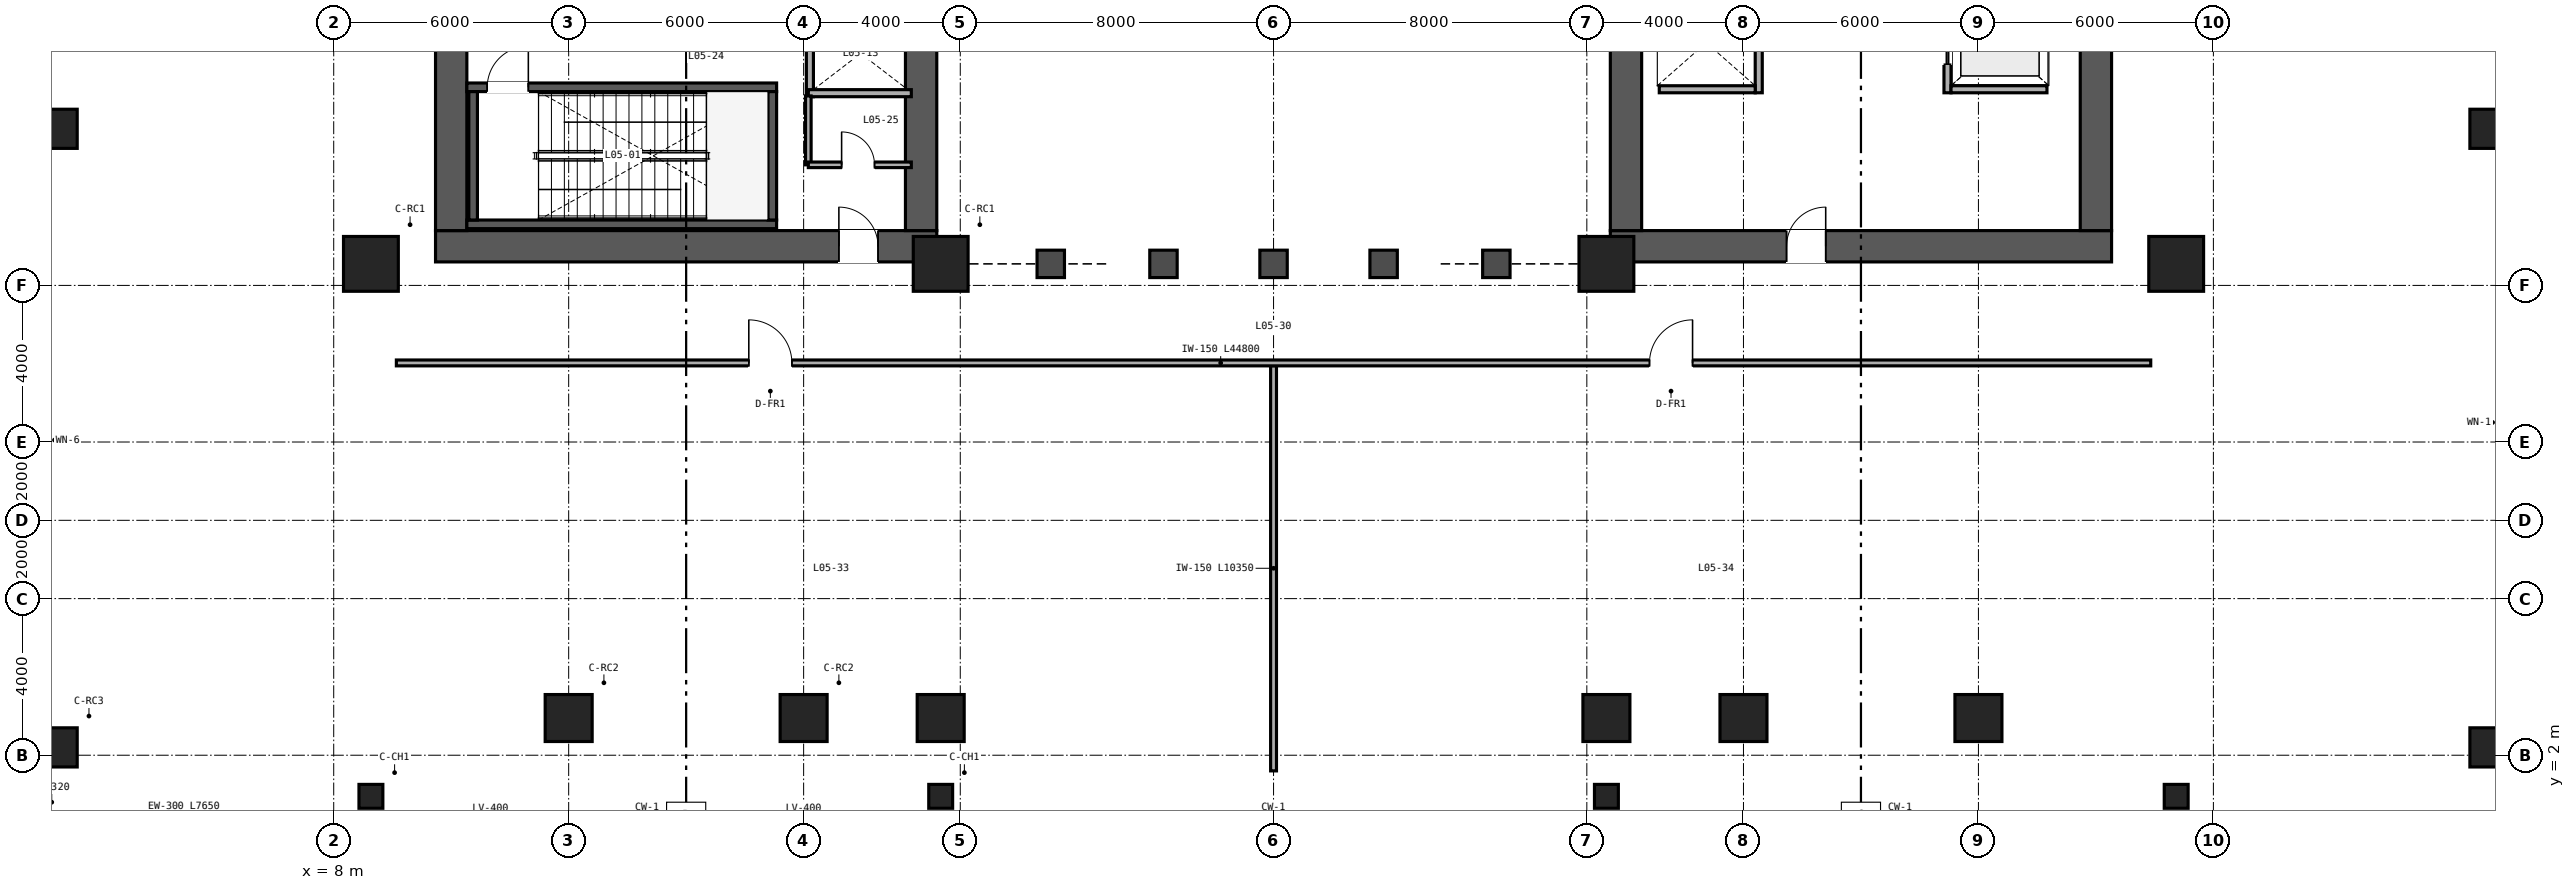
"""IFC4 building model, lengths in metres.
Left out: names, types, materials, properties, quantities, classifications, styles, units other than length and angle.
Written with IfcOpenShell. Run it as: python <this file> out.ifc"""

import sys

from ifc_helpers import new_model, si_unit, direction, frame, frame_2d, origin, origin_2d, place, context, subcontext, project, spatial, rectangle, hollow_circle, extrude, source, transform, mapped, element, fill, save


model = new_model("IFC4")
c1 = context("Model", 3, precision=1e-05, world=origin(), true_north=direction((0.0, 1.0)))
c2 = subcontext(c1, "Body", "Model", "MODEL_VIEW")
j1 = project(units=[si_unit("LENGTHUNIT", "METRE"), si_unit("PLANEANGLEUNIT", "RADIAN")], contexts=[c1])
p1 = place(None, origin())
s1 = spatial("IfcSite", under=j1, at=p1, CompositionType="ELEMENT")
p2 = place(p1, origin())
s2 = spatial("IfcBuilding", under=s1, at=p2, CompositionType="ELEMENT")
p3 = place(p2, frame((0.0, 0.0, 24.0)))
s3 = spatial("IfcBuildingStorey", under=s2, at=p3, CompositionType="ELEMENT", Elevation=24.0)
p4 = place(p3, frame((10.6, 15.0, 0.0), z_axis=(0.0, 0.0, 1.0), x_axis=(1.0, 0.0, 0.0)))
e1 = element("IfcWall", 1, at=p4, inside=s3, PredefinedType="SHEAR", context=c2, shape_type="SweptSolid", body=[
    extrude(rectangle(XDim=12.8, YDim=0.8, at=frame_2d((6.4, 0.0))), origin(), (0.0, 0.0, 1.0), 4.48),
])
p5 = place(p4, frame((10.3, 0.0, 0.0)))
e2 = element("IfcOpeningElement", 2, at=p5, cuts=e1, PredefinedType="OPENING", context=c2, shape_type="SweptSolid", body=[
    extrude(rectangle(XDim=1.0, YDim=2.15, at=frame_2d((0.5, 1.075))), frame((0.0, 0.41, 0.0), z_axis=(0.0, -1.0, 0.0), x_axis=(1.0, 0.0, 0.0)), (0.0, 0.0, 1.0), 0.82),
])
for number, where, z_axis, x_axis in (
    (3, (11.0, 15.4, 0.0), (0.0, 0.0, 1.0), (0.0, 1.0, 0.0)),
    (4, (23.0, 15.4, 0.0), (0.0, 0.0, 1.0), (0.0, 1.0, 0.0)),
):
    element("IfcWall", number, at=place(p3, frame(where, z_axis=z_axis, x_axis=x_axis)), inside=s3, PredefinedType="SHEAR", context=c2, shape_type="SweptSolid", body=[
        extrude(rectangle(XDim=21.2, YDim=0.8, at=frame_2d((10.6, 0.0))), origin(), (0.0, 0.0, 1.0), 4.48),
    ])
p6 = place(p3, frame((40.6, 15.0, 0.0), z_axis=(0.0, 0.0, 1.0), x_axis=(1.0, 0.0, 0.0)))
e5 = element("IfcWall", 5, at=p6, inside=s3, PredefinedType="SHEAR", context=c2, shape_type="SweptSolid", body=[
    extrude(rectangle(XDim=12.8, YDim=0.8, at=frame_2d((6.4, 0.0))), origin(), (0.0, 0.0, 1.0), 4.48),
])
p7 = place(p6, frame((4.5, 0.0, 0.0)))
e6 = element("IfcOpeningElement", 6, at=p7, cuts=e5, PredefinedType="OPENING", context=c2, shape_type="SweptSolid", body=[
    extrude(rectangle(XDim=1.0, YDim=2.15, at=frame_2d((0.5, 1.075))), frame((0.0, 0.41, 0.0), z_axis=(0.0, -1.0, 0.0), x_axis=(1.0, 0.0, 0.0)), (0.0, 0.0, 1.0), 0.82),
])
for number, where, z_axis, x_axis in (
    (7, (41.0, 15.4, 0.0), (0.0, 0.0, 1.0), (0.0, 1.0, 0.0)),
    (8, (53.0, 15.4, 0.0), (0.0, 0.0, 1.0), (0.0, 1.0, 0.0)),
):
    element("IfcWall", number, at=place(p3, frame(where, z_axis=z_axis, x_axis=x_axis)), inside=s3, PredefinedType="SHEAR", context=c2, shape_type="SweptSolid", body=[
        extrude(rectangle(XDim=21.2, YDim=0.8, at=frame_2d((10.6, 0.0))), origin(), (0.0, 0.0, 1.0), 4.48),
    ])
p8 = place(p3, frame((11.4, 15.56, 0.0), z_axis=(0.0, 0.0, 1.0), x_axis=(1.0, 0.0, 0.0)))
e9 = element("IfcWall", 9, at=p8, inside=s3, PredefinedType="SHEAR", context=c2, shape_type="SweptSolid", body=[
    extrude(rectangle(XDim=7.91, YDim=0.22, at=frame_2d((3.955, 0.0))), origin(), (0.0, 0.0, 1.0), 4.6),
])
p9 = place(p3, frame((11.4, 19.06, 0.0), z_axis=(0.0, 0.0, 1.0), x_axis=(1.0, 0.0, 0.0)))
e10 = element("IfcWall", 10, at=p9, inside=s3, PredefinedType="SHEAR", context=c2, shape_type="SweptSolid", body=[
    extrude(rectangle(XDim=7.91, YDim=0.22, at=frame_2d((3.955, 0.0))), origin(), (0.0, 0.0, 1.0), 4.6),
])
p10 = place(p9, frame((0.52, 0.0, 0.0)))
e11 = element("IfcOpeningElement", 11, at=p10, cuts=e10, PredefinedType="OPENING", context=c2, shape_type="SweptSolid", body=[
    extrude(rectangle(XDim=1.05, YDim=2.15, at=frame_2d((0.525, 1.075))), frame((0.0, 0.12, 0.0), z_axis=(0.0, -1.0, 0.0), x_axis=(1.0, 0.0, 0.0)), (0.0, 0.0, 1.0), 0.24),
])
for number, where, z_axis, x_axis in (
    (12, (11.56, 15.67, 0.0), (0.0, 0.0, 1.0), (0.0, 1.0, 0.0)),
    (13, (19.2, 15.67, 0.0), (0.0, 0.0, 1.0), (0.0, 1.0, 0.0)),
):
    element("IfcWall", number, at=place(p3, frame(where, z_axis=z_axis, x_axis=x_axis)), inside=s3, PredefinedType="SHEAR", context=c2, shape_type="SweptSolid", body=[
        extrude(rectangle(XDim=3.28, YDim=0.22, at=frame_2d((1.64, 0.0))), origin(), (0.0, 0.0, 1.0), 4.6),
    ])
m1 = source(origin(), c2, "Body", "SweptSolid", [
    extrude(rectangle(XDim=1.0, YDim=1.0, at=origin_2d()), origin(), (0.0, 0.0, 1.0), 4.48),
])
for number, where, z_axis, x_axis in (
    (14, (0.95, 2.2, 0.0), (0.0, 0.0, 1.0), (1.0, 0.0, 0.0)),
    (15, (63.05, 2.2, 0.0), (0.0, 0.0, 1.0), (1.0, 0.0, 0.0)),
    (16, (0.95, 18.0, 0.0), (0.0, 0.0, 1.0), (1.0, 0.0, 0.0)),
    (17, (63.05, 18.0, 0.0), (0.0, 0.0, 1.0), (1.0, 0.0, 0.0)),
):
    element("IfcColumn", number, at=place(p3, frame(where, z_axis=z_axis, x_axis=x_axis)), inside=s3, PredefinedType="COLUMN", context=c2, shape_type="MappedRepresentation", body=[
        mapped(m1, transform((0.0, 0.0, 0.0), scale=1.0)),
    ])
m2 = source(origin(), c2, "Body", "SweptSolid", [
    extrude(hollow_circle(Radius=0.305, WallThickness=0.025, at=origin_2d()), origin(), (0.0, 0.0, 1.0), 4.48),
])
for number, where, z_axis, x_axis in (
    (18, (8.95, 0.95, 0.0), (0.0, 0.0, 1.0), (1.0, 0.0, 0.0)),
    (19, (23.5, 0.95, 0.0), (0.0, 0.0, 1.0), (1.0, 0.0, 0.0)),
    (20, (40.5, 0.95, 0.0), (0.0, 0.0, 1.0), (1.0, 0.0, 0.0)),
    (21, (55.05, 0.95, 0.0), (0.0, 0.0, 1.0), (1.0, 0.0, 0.0)),
):
    element("IfcColumn", number, at=place(p3, frame(where, z_axis=z_axis, x_axis=x_axis)), inside=s3, PredefinedType="COLUMN", context=c2, shape_type="MappedRepresentation", body=[
        mapped(m2, transform((0.0, 0.0, 0.0), scale=1.0)),
    ])
m3 = source(origin(), c2, "Body", "SweptSolid", [
    extrude(rectangle(XDim=1.4, YDim=1.4, at=origin_2d()), origin(), (0.0, 0.0, 1.0), 4.48),
])
for number, where, z_axis, x_axis in (
    (22, (8.95, 14.55, 0.0), (0.0, 0.0, 1.0), (1.0, 0.0, 0.0)),
    (23, (23.5, 14.55, 0.0), (0.0, 0.0, 1.0), (1.0, 0.0, 0.0)),
    (24, (40.5, 14.55, 0.0), (0.0, 0.0, 1.0), (1.0, 0.0, 0.0)),
    (25, (55.05, 14.55, 0.0), (0.0, 0.0, 1.0), (1.0, 0.0, 0.0)),
):
    element("IfcColumn", number, at=place(p3, frame(where, z_axis=z_axis, x_axis=x_axis)), inside=s3, PredefinedType="COLUMN", context=c2, shape_type="MappedRepresentation", body=[
        mapped(m3, transform((0.0, 0.0, 0.0), scale=1.0)),
    ])
m4 = source(origin(), c2, "Body", "SweptSolid", [
    extrude(rectangle(XDim=1.2, YDim=1.2, at=origin_2d()), origin(), (0.0, 0.0, 1.0), 4.48),
])
for number, where, z_axis, x_axis in (
    (26, (14.0, 2.95, 0.0), (0.0, 0.0, 1.0), (1.0, 0.0, 0.0)),
    (27, (20.0, 2.95, 0.0), (0.0, 0.0, 1.0), (1.0, 0.0, 0.0)),
    (28, (23.5, 2.95, 0.0), (0.0, 0.0, 1.0), (1.0, 0.0, 0.0)),
    (29, (40.5, 2.95, 0.0), (0.0, 0.0, 1.0), (1.0, 0.0, 0.0)),
    (30, (44.0, 2.95, 0.0), (0.0, 0.0, 1.0), (1.0, 0.0, 0.0)),
    (31, (50.0, 2.95, 0.0), (0.0, 0.0, 1.0), (1.0, 0.0, 0.0)),
):
    element("IfcColumn", number, at=place(p3, frame(where, z_axis=z_axis, x_axis=x_axis)), inside=s3, PredefinedType="COLUMN", context=c2, shape_type="MappedRepresentation", body=[
        mapped(m4, transform((0.0, 0.0, 0.0), scale=1.0)),
    ])
p11 = place(p3, frame((49.21, 18.92, 0.0), z_axis=(0.0, 0.0, 1.0), x_axis=(0.0, 1.0, 0.0)))
e32 = element("IfcWall", 32, at=p11, inside=s3, PredefinedType="SOLIDWALL", context=c2, shape_type="SweptSolid", body=[
    extrude(rectangle(XDim=7.96, YDim=0.18, at=frame_2d((3.98, 0.0))), origin(), (0.0, 0.0, 1.0), 4.48),
])
p12 = place(p11, frame((0.73, 0.0, 0.0)))
e33 = element("IfcOpeningElement", 33, at=p12, cuts=e32, PredefinedType="OPENING", context=c2, shape_type="SweptSolid", body=[
    extrude(rectangle(XDim=1.1, YDim=2.2, at=frame_2d((0.55, 1.1))), frame((0.0, 0.1, 0.0), z_axis=(0.0, -1.0, 0.0), x_axis=(1.0, 0.0, 0.0)), (0.0, 0.0, 1.0), 0.2),
])
p13 = place(p11, frame((3.43, 0.0, 0.0)))
e34 = element("IfcOpeningElement", 34, at=p13, cuts=e32, PredefinedType="OPENING", context=c2, shape_type="SweptSolid", body=[
    extrude(rectangle(XDim=1.1, YDim=2.2, at=frame_2d((0.55, 1.1))), frame((0.0, 0.1, 0.0), z_axis=(0.0, -1.0, 0.0), x_axis=(1.0, 0.0, 0.0)), (0.0, 0.0, 1.0), 0.2),
])
p14 = place(p11, frame((6.13, 0.0, 0.0)))
e35 = element("IfcOpeningElement", 35, at=p14, cuts=e32, PredefinedType="OPENING", context=c2, shape_type="SweptSolid", body=[
    extrude(rectangle(XDim=1.1, YDim=2.2, at=frame_2d((0.55, 1.1))), frame((0.0, 0.1, 0.0), z_axis=(0.0, -1.0, 0.0), x_axis=(1.0, 0.0, 0.0)), (0.0, 0.0, 1.0), 0.2),
])
p15 = place(p3, frame((49.3, 19.01, 0.0), z_axis=(0.0, 0.0, 1.0), x_axis=(1.0, 0.0, 0.0)))
e36 = element("IfcWall", 36, at=p15, inside=s3, PredefinedType="SOLIDWALL", context=c2, shape_type="SweptSolid", body=[
    extrude(rectangle(XDim=2.45, YDim=0.18, at=frame_2d((1.225, 0.0))), origin(), (0.0, 0.0, 1.0), 4.48),
])
p16 = place(p3, frame((44.39, 18.92, 0.0), z_axis=(0.0, 0.0, 1.0), x_axis=(0.0, 1.0, 0.0)))
e37 = element("IfcWall", 37, at=p16, inside=s3, PredefinedType="SOLIDWALL", context=c2, shape_type="SweptSolid", body=[
    extrude(rectangle(XDim=7.96, YDim=0.18, at=frame_2d((3.98, 0.0))), origin(), (0.0, 0.0, 1.0), 4.48),
])
p17 = place(p3, frame((41.85, 19.01, 0.0), z_axis=(0.0, 0.0, 1.0), x_axis=(1.0, 0.0, 0.0)))
e38 = element("IfcWall", 38, at=p17, inside=s3, PredefinedType="SOLIDWALL", context=c2, shape_type="SweptSolid", body=[
    extrude(rectangle(XDim=2.45, YDim=0.18, at=frame_2d((1.225, 0.0))), origin(), (0.0, 0.0, 1.0), 4.48),
])
p18 = place(p3, frame((20.16, 18.82, 0.0), z_axis=(0.0, 0.0, 1.0), x_axis=(0.0, 1.0, 0.0)))
e39 = element("IfcWall", 39, at=p18, inside=s3, PredefinedType="SOLIDWALL", context=c2, shape_type="SweptSolid", body=[
    extrude(rectangle(XDim=6.32, YDim=0.18, at=frame_2d((3.16, 0.0))), origin(), (0.0, 0.0, 1.0), 3.38),
])
p19 = place(p3, frame((20.12, 18.91, 0.0), z_axis=(0.0, 0.0, 1.0), x_axis=(1.0, 0.0, 0.0)))
e40 = element("IfcWall", 40, at=p19, inside=s3, PredefinedType="SOLIDWALL", context=c2, shape_type="SweptSolid", body=[
    extrude(rectangle(XDim=2.63, YDim=0.18, at=frame_2d((1.315, 0.0))), origin(), (0.0, 0.0, 1.0), 4.48),
])
p20 = place(p3, frame((20.12, 17.08, 0.0), z_axis=(0.0, 0.0, 1.0), x_axis=(0.0, 1.0, 0.0)))
e41 = element("IfcWall", 41, at=p20, inside=s3, PredefinedType="PARTITIONING", context=c2, shape_type="SweptSolid", body=[
    extrude(rectangle(XDim=1.76, YDim=0.142, at=frame_2d((0.88, 0.0))), origin(), (0.0, 0.0, 1.0), 4.48),
])
p21 = place(p3, frame((20.12, 17.08, 0.0), z_axis=(0.0, 0.0, 1.0), x_axis=(1.0, 0.0, 0.0)))
e42 = element("IfcWall", 42, at=p21, inside=s3, PredefinedType="PARTITIONING", context=c2, shape_type="SweptSolid", body=[
    extrude(rectangle(XDim=2.63, YDim=0.142, at=frame_2d((1.315, 0.0))), origin(), (0.0, 0.0, 1.0), 4.48),
])
p22 = place(p21, frame((0.85, 0.0, 0.0)))
e43 = element("IfcOpeningElement", 43, at=p22, cuts=e42, PredefinedType="OPENING", context=c2, shape_type="SweptSolid", body=[
    extrude(rectangle(XDim=0.84, YDim=2.1, at=frame_2d((0.42, 1.05))), frame((0.0, 0.081, 0.0), z_axis=(0.0, -1.0, 0.0), x_axis=(1.0, 0.0, 0.0)), (0.0, 0.0, 1.0), 0.162),
])
p23 = place(p3, frame((32.0, 1.6, 0.0), z_axis=(0.0, 0.0, 1.0), x_axis=(0.0, 1.0, 0.0)))
e44 = element("IfcWall", 44, at=p23, inside=s3, PredefinedType="PARTITIONING", context=c2, shape_type="SweptSolid", body=[
    extrude(rectangle(XDim=10.35, YDim=0.15, at=frame_2d((5.175, 0.0))), origin(), (0.0, 0.0, 1.0), 3.532),
])
p24 = place(p3, frame((9.6, 12.02, 0.0), z_axis=(0.0, 0.0, 1.0), x_axis=(1.0, 0.0, 0.0)))
e45 = element("IfcWall", 45, at=p24, inside=s3, PredefinedType="PARTITIONING", context=c2, shape_type="SweptSolid", body=[
    extrude(rectangle(XDim=44.8, YDim=0.15, at=frame_2d((22.4, 0.0))), origin(), (0.0, 0.0, 1.0), 3.701),
])
p25 = place(p24, frame((9.0, 0.0, 0.0)))
e46 = element("IfcOpeningElement", 46, at=p25, cuts=e45, PredefinedType="OPENING", context=c2, shape_type="SweptSolid", body=[
    extrude(rectangle(XDim=1.1, YDim=2.15, at=frame_2d((0.55, 1.075))), frame((0.0, 0.085, 0.0), z_axis=(0.0, -1.0, 0.0), x_axis=(1.0, 0.0, 0.0)), (0.0, 0.0, 1.0), 0.17),
])
p26 = place(p24, frame((32.0, 0.0, 0.0)))
e47 = element("IfcOpeningElement", 47, at=p26, cuts=e45, PredefinedType="OPENING", context=c2, shape_type="SweptSolid", body=[
    extrude(rectangle(XDim=1.1, YDim=2.15, at=frame_2d((0.55, 1.075))), frame((0.0, 0.085, 0.0), z_axis=(0.0, -1.0, 0.0), x_axis=(1.0, 0.0, 0.0)), (0.0, 0.0, 1.0), 0.17),
])
m5 = source(origin(), c2, "Body", "SweptSolid", [
    extrude(rectangle(XDim=1.05, YDim=2.15, at=frame_2d((0.525, 1.075))), frame((0.0, 0.025, 0.0), z_axis=(0.0, -1.0, 0.0), x_axis=(1.0, 0.0, 0.0)), (0.0, 0.0, 1.0), 0.05),
])
p27 = place(p10, origin())
e48 = element("IfcDoor", 48, at=p27, inside=s3, OperationType="SINGLE_SWING_RIGHT", PredefinedType="DOOR", context=c2, shape_type="MappedRepresentation", body=[
    mapped(m5, transform((0.0, 0.0, 0.0), scale=1.0)),
])
fill(e11, e48)
m6 = source(origin(), c2, "Body", "SweptSolid", [
    extrude(rectangle(XDim=1.1, YDim=2.2, at=frame_2d((0.55, 1.1))), frame((0.0, 0.025, 0.0), z_axis=(0.0, -1.0, 0.0), x_axis=(1.0, 0.0, 0.0)), (0.0, 0.0, 1.0), 0.05),
])
p28 = place(p12, origin())
e49 = element("IfcDoor", 49, at=p28, inside=s3, OperationType="DOUBLE_DOOR_SLIDING", PredefinedType="DOOR", context=c2, shape_type="MappedRepresentation", body=[
    mapped(m6, transform((0.0, 0.0, 0.0), scale=1.0)),
])
fill(e33, e49)
m7 = source(origin(), c2, "Body", "SweptSolid", [
    extrude(rectangle(XDim=0.84, YDim=2.1, at=frame_2d((0.42, 1.05))), frame((0.0, 0.025, 0.0), z_axis=(0.0, -1.0, 0.0), x_axis=(1.0, 0.0, 0.0)), (0.0, 0.0, 1.0), 0.05),
])
p29 = place(p22, origin())
e50 = element("IfcDoor", 50, at=p29, inside=s3, OperationType="SINGLE_SWING_LEFT", PredefinedType="DOOR", context=c2, shape_type="MappedRepresentation", body=[
    mapped(m7, transform((0.0, 0.0, 0.0), scale=1.0)),
])
fill(e43, e50)
m8 = source(origin(), c2, "Body", "SweptSolid", [
    extrude(rectangle(XDim=1.0, YDim=2.15, at=frame_2d((0.5, 1.075))), frame((0.0, 0.025, 0.0), z_axis=(0.0, -1.0, 0.0), x_axis=(1.0, 0.0, 0.0)), (0.0, 0.0, 1.0), 0.05),
])
p30 = place(p5, origin())
e51 = element("IfcDoor", 51, at=p30, inside=s3, OperationType="SINGLE_SWING_LEFT", PredefinedType="DOOR", context=c2, shape_type="MappedRepresentation", body=[
    mapped(m8, transform((0.0, 0.0, 0.0), scale=1.0)),
])
fill(e2, e51)
p31 = place(p7, origin())
e52 = element("IfcDoor", 52, at=p31, inside=s3, OperationType="SINGLE_SWING_RIGHT", PredefinedType="DOOR", context=c2, shape_type="MappedRepresentation", body=[
    mapped(m8, transform((0.0, 0.0, 0.0), scale=1.0)),
])
fill(e6, e52)
m9 = source(origin(), c2, "Body", "SweptSolid", [
    extrude(rectangle(XDim=1.1, YDim=2.15, at=frame_2d((0.55, 1.075))), frame((0.0, 0.025, 0.0), z_axis=(0.0, -1.0, 0.0), x_axis=(1.0, 0.0, 0.0)), (0.0, 0.0, 1.0), 0.05),
])
p32 = place(p25, origin())
e53 = element("IfcDoor", 53, at=p32, inside=s3, OperationType="SINGLE_SWING_LEFT", PredefinedType="DOOR", context=c2, shape_type="MappedRepresentation", body=[
    mapped(m9, transform((0.0, 0.0, 0.0), scale=1.0)),
])
fill(e46, e53)
p33 = place(p26, origin())
e54 = element("IfcDoor", 54, at=p33, inside=s3, OperationType="SINGLE_SWING_RIGHT", PredefinedType="DOOR", context=c2, shape_type="MappedRepresentation", body=[
    mapped(m9, transform((0.0, 0.0, 0.0), scale=1.0)),
])
fill(e47, e54)
save(model, sys.argv[1])
